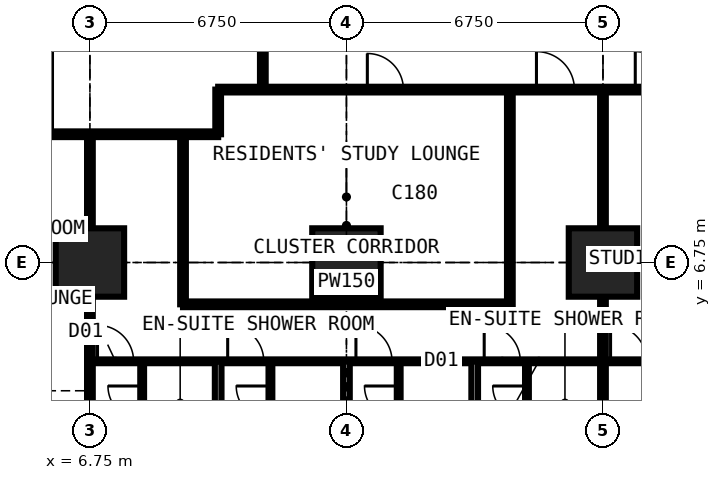
"""IFC4 building model, lengths in metres.
Left out: names, types, materials, properties, quantities, classifications, styles, units other than length and angle.
Written with IfcOpenShell. Run it as: python <this file> out.ifc"""

import sys

from ifc_helpers import new_model, si_unit, direction, frame, frame_2d, origin, origin_2d, place, context, subcontext, project, spatial, rectangle, extrude, element, fill, save


model = new_model("IFC4")
c1 = context("Model", 3, precision=1e-05, world=origin(), true_north=direction((0.0, 1.0)))
c2 = subcontext(c1, "Body", "Model", "MODEL_VIEW")
j1 = project(units=[si_unit("LENGTHUNIT", "METRE"), si_unit("PLANEANGLEUNIT", "RADIAN")], contexts=[c1])
p1 = place(None, origin())
s1 = spatial("IfcSite", under=j1, at=p1, CompositionType="ELEMENT")
p2 = place(p1, origin())
s2 = spatial("IfcBuilding", under=s1, at=p2, CompositionType="ELEMENT")
p3 = place(p2, frame((0.0, 0.0, 68.4)))
s3 = spatial("IfcBuildingStorey", under=s2, at=p3, CompositionType="ELEMENT", Elevation=68.4)
for number, where, z_axis, x_axis in (
    (1, (6.75, 6.75, 0.0), (0.0, 0.0, 1.0), (1.0, 0.0, 0.0)),
    (2, (13.5, 6.75, 0.0), (0.0, 0.0, 1.0), (1.0, 0.0, 0.0)),
    (3, (20.25, 6.75, 0.0), (0.0, 0.0, 1.0), (1.0, 0.0, 0.0)),
):
    element("IfcColumn", number, at=place(p3, frame(where, z_axis=z_axis, x_axis=x_axis)), inside=s3, PredefinedType="COLUMN", context=c2, shape_type="SweptSolid", body=[
        extrude(rectangle(XDim=1.8, YDim=1.8, at=origin_2d()), origin(), (0.0, 0.0, 1.0), 3.6),
    ])
p4 = place(p3, frame((-0.734, 10.125, 0.0), z_axis=(0.0, 0.0, 1.0), x_axis=(1.0, 0.0, 0.0)))
e4 = element("IfcWall", 4, at=p4, inside=s3, PredefinedType="PARTITIONING", context=c2, shape_type="SweptSolid", body=[
    extrude(rectangle(XDim=10.859, YDim=0.15, at=frame_2d((5.429, 0.0))), origin(), (0.0, 0.0, 1.0), 3.375),
])
p5 = place(p4, frame((5.134, 0.0, 0.0)))
e5 = element("IfcOpeningElement", 5, at=p5, cuts=e4, PredefinedType="OPENING", context=c2, shape_type="SweptSolid", body=[
    extrude(rectangle(XDim=1.0, YDim=2.2, at=frame_2d((0.5, 1.1))), frame((0.0, 0.085, 0.0), z_axis=(0.0, -1.0, 0.0), x_axis=(1.0, 0.0, 0.0)), (0.0, 0.0, 1.0), 0.17),
])
p6 = place(p3, frame((6.75, -0.734, 0.0), z_axis=(0.0, 0.0, 1.0), x_axis=(0.0, 1.0, 0.0)))
e6 = element("IfcWall", 6, at=p6, inside=s3, PredefinedType="PARTITIONING", context=c2, shape_type="SweptSolid", body=[
    extrude(rectangle(XDim=10.859, YDim=0.15, at=frame_2d((5.429, 0.0))), origin(), (0.0, 0.0, 1.0), 2.877),
])
p7 = place(p3, frame((6.75, 4.15, 0.0), z_axis=(0.0, 0.0, 1.0), x_axis=(1.0, 0.0, 0.0)))
e7 = element("IfcWall", 7, at=p7, inside=s3, PredefinedType="PARTITIONING", context=c2, shape_type="SweptSolid", body=[
    extrude(rectangle(XDim=23.625, YDim=0.1, at=frame_2d((11.812, 0.0))), origin(), (0.0, 0.0, 1.0), 3.375),
])
p8 = place(p7, frame((0.2, 0.0, 0.0)))
e8 = element("IfcOpeningElement", 8, at=p8, cuts=e7, PredefinedType="OPENING", context=c2, shape_type="SweptSolid", body=[
    extrude(rectangle(XDim=0.95, YDim=2.2, at=frame_2d((0.475, 1.1))), frame((0.0, 0.06, 0.0), z_axis=(0.0, -1.0, 0.0), x_axis=(1.0, 0.0, 0.0)), (0.0, 0.0, 1.0), 0.12),
])
p9 = place(p7, frame((3.625, 0.0, 0.0)))
e9 = element("IfcOpeningElement", 9, at=p9, cuts=e7, PredefinedType="OPENING", context=c2, shape_type="SweptSolid", body=[
    extrude(rectangle(XDim=0.95, YDim=2.2, at=frame_2d((0.475, 1.1))), frame((0.0, 0.06, 0.0), z_axis=(0.0, -1.0, 0.0), x_axis=(1.0, 0.0, 0.0)), (0.0, 0.0, 1.0), 0.12),
])
p10 = place(p7, frame((7.0, 0.0, 0.0)))
e10 = element("IfcOpeningElement", 10, at=p10, cuts=e7, PredefinedType="OPENING", context=c2, shape_type="SweptSolid", body=[
    extrude(rectangle(XDim=0.95, YDim=2.2, at=frame_2d((0.475, 1.1))), frame((0.0, 0.06, 0.0), z_axis=(0.0, -1.0, 0.0), x_axis=(1.0, 0.0, 0.0)), (0.0, 0.0, 1.0), 0.12),
])
p11 = place(p7, frame((10.375, 0.0, 0.0)))
e11 = element("IfcOpeningElement", 11, at=p11, cuts=e7, PredefinedType="OPENING", context=c2, shape_type="SweptSolid", body=[
    extrude(rectangle(XDim=0.95, YDim=2.2, at=frame_2d((0.475, 1.1))), frame((0.0, 0.06, 0.0), z_axis=(0.0, -1.0, 0.0), x_axis=(1.0, 0.0, 0.0)), (0.0, 0.0, 1.0), 0.12),
])
p12 = place(p7, frame((18.475, 0.0, 0.0)))
e12 = element("IfcOpeningElement", 12, at=p12, cuts=e7, PredefinedType="OPENING", context=c2, shape_type="SweptSolid", body=[
    extrude(rectangle(XDim=0.95, YDim=2.2, at=frame_2d((0.475, 1.1))), frame((0.0, 0.06, 0.0), z_axis=(0.0, -1.0, 0.0), x_axis=(1.0, 0.0, 0.0)), (0.0, 0.0, 1.0), 0.12),
])
p13 = place(p7, frame((13.7, 0.0, 0.0)))
e13 = element("IfcOpeningElement", 13, at=p13, cuts=e7, PredefinedType="OPENING", context=c2, shape_type="SweptSolid", body=[
    extrude(rectangle(XDim=0.95, YDim=2.2, at=frame_2d((0.475, 1.1))), frame((0.0, 0.06, 0.0), z_axis=(0.0, -1.0, 0.0), x_axis=(1.0, 0.0, 0.0)), (0.0, 0.0, 1.0), 0.12),
])
p14 = place(p3, frame((8.125, 1.95, 0.0), z_axis=(0.0, 0.0, 1.0), x_axis=(0.0, 1.0, 0.0)))
e14 = element("IfcWall", 14, at=p14, inside=s3, PredefinedType="PARTITIONING", context=c2, shape_type="SweptSolid", body=[
    extrude(rectangle(XDim=2.2, YDim=0.1, at=frame_2d((1.1, 0.0))), origin(), (0.0, 0.0, 1.0), 3.375),
])
p15 = place(p14, frame((0.65, 0.0, 0.0)))
e15 = element("IfcOpeningElement", 15, at=p15, cuts=e14, PredefinedType="OPENING", context=c2, shape_type="SweptSolid", body=[
    extrude(rectangle(XDim=0.9, YDim=2.2, at=frame_2d((0.45, 1.1))), frame((0.0, 0.06, 0.0), z_axis=(0.0, -1.0, 0.0), x_axis=(1.0, 0.0, 0.0)), (0.0, 0.0, 1.0), 0.12),
])
p16 = place(p3, frame((9.2, 5.65, 0.0), z_axis=(0.0, 0.0, 1.0), x_axis=(0.0, 1.0, 0.0)))
e16 = element("IfcWall", 16, at=p16, inside=s3, PredefinedType="PARTITIONING", context=c2, shape_type="SweptSolid", body=[
    extrude(rectangle(XDim=4.475, YDim=0.15, at=frame_2d((2.238, 0.0))), origin(), (0.0, 0.0, 1.0), 3.375),
])
p17 = place(p3, frame((9.2, 5.65, 0.0), z_axis=(0.0, 0.0, 1.0), x_axis=(1.0, 0.0, 0.0)))
e17 = element("IfcWall", 17, at=p17, inside=s3, PredefinedType="PARTITIONING", context=c2, shape_type="SweptSolid", body=[
    extrude(rectangle(XDim=8.6, YDim=0.15, at=frame_2d((4.3, 0.0))), origin(), (0.0, 0.0, 1.0), 3.375),
])
p18 = place(p3, frame((10.125, -0.734, 0.0), z_axis=(0.0, 0.0, 1.0), x_axis=(0.0, 1.0, 0.0)))
e18 = element("IfcWall", 18, at=p18, inside=s3, PredefinedType="PARTITIONING", context=c2, shape_type="SweptSolid", body=[
    extrude(rectangle(XDim=4.884, YDim=0.175, at=frame_2d((2.442, 0.0))), origin(), (0.0, 0.0, 1.0), 3.375),
])
p19 = place(p3, frame((10.125, 10.125, 0.0), z_axis=(0.0, 0.0, 1.0), x_axis=(0.0, 1.0, 0.0)))
e19 = element("IfcWall", 19, at=p19, inside=s3, PredefinedType="PARTITIONING", context=c2, shape_type="SweptSolid", body=[
    extrude(rectangle(XDim=1.175, YDim=0.15, at=frame_2d((0.587, 0.0))), origin(), (0.0, 0.0, 1.0), 3.375),
])
p20 = place(p3, frame((10.125, 11.3, 0.0), z_axis=(0.0, 0.0, 1.0), x_axis=(1.0, 0.0, 0.0)))
e20 = element("IfcWall", 20, at=p20, inside=s3, PredefinedType="PARTITIONING", context=c2, shape_type="SweptSolid", body=[
    extrude(rectangle(XDim=20.675, YDim=0.15, at=frame_2d((10.337, 0.0))), origin(), (0.0, 0.0, 1.0), 3.375),
])
p21 = place(p20, frame((8.375, 0.0, 0.0)))
e21 = element("IfcOpeningElement", 21, at=p21, cuts=e20, PredefinedType="OPENING", context=c2, shape_type="SweptSolid", body=[
    extrude(rectangle(XDim=1.0, YDim=2.2, at=frame_2d((0.5, 1.1))), frame((0.0, 0.085, 0.0), z_axis=(0.0, -1.0, 0.0), x_axis=(1.0, 0.0, 0.0)), (0.0, 0.0, 1.0), 0.17),
])
p22 = place(p20, frame((10.975, 0.0, 0.0)))
e22 = element("IfcOpeningElement", 22, at=p22, cuts=e20, PredefinedType="OPENING", context=c2, shape_type="SweptSolid", body=[
    extrude(rectangle(XDim=1.0, YDim=2.2, at=frame_2d((0.5, 1.1))), frame((0.0, 0.085, 0.0), z_axis=(0.0, -1.0, 0.0), x_axis=(1.0, 0.0, 0.0)), (0.0, 0.0, 1.0), 0.17),
])
p23 = place(p20, frame((3.925, 0.0, 0.0)))
e23 = element("IfcOpeningElement", 23, at=p23, cuts=e20, PredefinedType="OPENING", context=c2, shape_type="SweptSolid", body=[
    extrude(rectangle(XDim=0.95, YDim=2.2, at=frame_2d((0.475, 1.1))), frame((0.0, 0.085, 0.0), z_axis=(0.0, -1.0, 0.0), x_axis=(1.0, 0.0, 0.0)), (0.0, 0.0, 1.0), 0.17),
])
p24 = place(p3, frame((11.3, 11.3, 0.0), z_axis=(0.0, 0.0, 1.0), x_axis=(0.0, 1.0, 0.0)))
e24 = element("IfcWall", 24, at=p24, inside=s3, PredefinedType="PARTITIONING", context=c2, shape_type="SweptSolid", body=[
    extrude(rectangle(XDim=19.075, YDim=0.15, at=frame_2d((9.538, 0.0))), origin(), (0.0, 0.0, 1.0), 3.375),
])
p25 = place(p24, frame((12.875, 0.0, 0.0)))
e25 = element("IfcOpeningElement", 25, at=p25, cuts=e24, PredefinedType="OPENING", context=c2, shape_type="SweptSolid", body=[
    extrude(rectangle(XDim=1.0, YDim=2.2, at=frame_2d((0.5, 1.1))), frame((0.0, 0.085, 0.0), z_axis=(0.0, -1.0, 0.0), x_axis=(1.0, 0.0, 0.0)), (0.0, 0.0, 1.0), 0.17),
])
p26 = place(p24, frame((10.438, 0.0, 0.0)))
e26 = element("IfcOpeningElement", 26, at=p26, cuts=e24, PredefinedType="OPENING", context=c2, shape_type="SweptSolid", body=[
    extrude(rectangle(XDim=1.0, YDim=2.2, at=frame_2d((0.5, 1.1))), frame((0.0, 0.085, 0.0), z_axis=(0.0, -1.0, 0.0), x_axis=(1.0, 0.0, 0.0)), (0.0, 0.0, 1.0), 0.17),
])
p27 = place(p24, frame((15.675, 0.0, 0.0)))
e27 = element("IfcOpeningElement", 27, at=p27, cuts=e24, PredefinedType="OPENING", context=c2, shape_type="SweptSolid", body=[
    extrude(rectangle(XDim=0.95, YDim=2.2, at=frame_2d((0.475, 1.1))), frame((0.0, 0.085, 0.0), z_axis=(0.0, -1.0, 0.0), x_axis=(1.0, 0.0, 0.0)), (0.0, 0.0, 1.0), 0.17),
])
p28 = place(p3, frame((11.5, 1.95, 0.0), z_axis=(0.0, 0.0, 1.0), x_axis=(0.0, 1.0, 0.0)))
e28 = element("IfcWall", 28, at=p28, inside=s3, PredefinedType="PARTITIONING", context=c2, shape_type="SweptSolid", body=[
    extrude(rectangle(XDim=2.2, YDim=0.1, at=frame_2d((1.1, 0.0))), origin(), (0.0, 0.0, 1.0), 3.375),
])
p29 = place(p28, frame((0.65, 0.0, 0.0)))
e29 = element("IfcOpeningElement", 29, at=p29, cuts=e28, PredefinedType="OPENING", context=c2, shape_type="SweptSolid", body=[
    extrude(rectangle(XDim=0.9, YDim=2.2, at=frame_2d((0.45, 1.1))), frame((0.0, 0.06, 0.0), z_axis=(0.0, -1.0, 0.0), x_axis=(1.0, 0.0, 0.0)), (0.0, 0.0, 1.0), 0.12),
])
p30 = place(p3, frame((13.5, -0.734, 0.0), z_axis=(0.0, 0.0, 1.0), x_axis=(0.0, 1.0, 0.0)))
e30 = element("IfcWall", 30, at=p30, inside=s3, PredefinedType="PARTITIONING", context=c2, shape_type="SweptSolid", body=[
    extrude(rectangle(XDim=4.884, YDim=0.175, at=frame_2d((2.442, 0.0))), origin(), (0.0, 0.0, 1.0), 2.877),
])
p31 = place(p3, frame((14.875, 1.95, 0.0), z_axis=(0.0, 0.0, 1.0), x_axis=(0.0, 1.0, 0.0)))
e31 = element("IfcWall", 31, at=p31, inside=s3, PredefinedType="PARTITIONING", context=c2, shape_type="SweptSolid", body=[
    extrude(rectangle(XDim=2.2, YDim=0.1, at=frame_2d((1.1, 0.0))), origin(), (0.0, 0.0, 1.0), 3.375),
])
p32 = place(p31, frame((0.65, 0.0, 0.0)))
e32 = element("IfcOpeningElement", 32, at=p32, cuts=e31, PredefinedType="OPENING", context=c2, shape_type="SweptSolid", body=[
    extrude(rectangle(XDim=0.9, YDim=2.2, at=frame_2d((0.45, 1.1))), frame((0.0, 0.06, 0.0), z_axis=(0.0, -1.0, 0.0), x_axis=(1.0, 0.0, 0.0)), (0.0, 0.0, 1.0), 0.12),
])
p33 = place(p3, frame((16.875, -0.734, 0.0), z_axis=(0.0, 0.0, 1.0), x_axis=(0.0, 1.0, 0.0)))
e33 = element("IfcWall", 33, at=p33, inside=s3, PredefinedType="PARTITIONING", context=c2, shape_type="SweptSolid", body=[
    extrude(rectangle(XDim=4.884, YDim=0.175, at=frame_2d((2.442, 0.0))), origin(), (0.0, 0.0, 1.0), 3.375),
])
p34 = place(p3, frame((17.8, 5.65, 0.0), z_axis=(0.0, 0.0, 1.0), x_axis=(0.0, 1.0, 0.0)))
e34 = element("IfcWall", 34, at=p34, inside=s3, PredefinedType="PARTITIONING", context=c2, shape_type="SweptSolid", body=[
    extrude(rectangle(XDim=5.65, YDim=0.15, at=frame_2d((2.825, 0.0))), origin(), (0.0, 0.0, 1.0), 3.375),
])
p35 = place(p3, frame((18.25, 1.95, 0.0), z_axis=(0.0, 0.0, 1.0), x_axis=(0.0, 1.0, 0.0)))
e35 = element("IfcWall", 35, at=p35, inside=s3, PredefinedType="PARTITIONING", context=c2, shape_type="SweptSolid", body=[
    extrude(rectangle(XDim=2.2, YDim=0.1, at=frame_2d((1.1, 0.0))), origin(), (0.0, 0.0, 1.0), 3.375),
])
p36 = place(p35, frame((0.65, 0.0, 0.0)))
e36 = element("IfcOpeningElement", 36, at=p36, cuts=e35, PredefinedType="OPENING", context=c2, shape_type="SweptSolid", body=[
    extrude(rectangle(XDim=0.9, YDim=2.2, at=frame_2d((0.45, 1.1))), frame((0.0, 0.06, 0.0), z_axis=(0.0, -1.0, 0.0), x_axis=(1.0, 0.0, 0.0)), (0.0, 0.0, 1.0), 0.12),
])
p37 = place(p3, frame((20.25, -0.734, 0.0), z_axis=(0.0, 0.0, 1.0), x_axis=(0.0, 1.0, 0.0)))
e37 = element("IfcWall", 37, at=p37, inside=s3, PredefinedType="PARTITIONING", context=c2, shape_type="SweptSolid", body=[
    extrude(rectangle(XDim=12.034, YDim=0.15, at=frame_2d((6.017, 0.0))), origin(), (0.0, 0.0, 1.0), 2.61),
])
p38 = place(p8, origin())
e38 = element("IfcDoor", 38, at=p38, inside=s3, OperationType="SINGLE_SWING_LEFT", PredefinedType="DOOR", context=c2, shape_type="SweptSolid", body=[
    extrude(rectangle(XDim=0.95, YDim=2.2, at=frame_2d((0.475, 1.1))), frame((0.0, 0.025, 0.0), z_axis=(0.0, -1.0, 0.0), x_axis=(1.0, 0.0, 0.0)), (0.0, 0.0, 1.0), 0.05),
])
fill(e8, e38)
p39 = place(p15, origin())
e39 = element("IfcDoor", 39, at=p39, inside=s3, OperationType="SINGLE_SWING_RIGHT", PredefinedType="DOOR", context=c2, shape_type="SweptSolid", body=[
    extrude(rectangle(XDim=0.9, YDim=2.2, at=frame_2d((0.45, 1.1))), frame((0.0, 0.025, 0.0), z_axis=(0.0, -1.0, 0.0), x_axis=(1.0, 0.0, 0.0)), (0.0, 0.0, 1.0), 0.05),
])
fill(e15, e39)
p40 = place(p9, origin())
e40 = element("IfcDoor", 40, at=p40, inside=s3, OperationType="SINGLE_SWING_LEFT", PredefinedType="DOOR", context=c2, shape_type="SweptSolid", body=[
    extrude(rectangle(XDim=0.95, YDim=2.2, at=frame_2d((0.475, 1.1))), frame((0.0, 0.025, 0.0), z_axis=(0.0, -1.0, 0.0), x_axis=(1.0, 0.0, 0.0)), (0.0, 0.0, 1.0), 0.05),
])
fill(e9, e40)
p41 = place(p29, origin())
e41 = element("IfcDoor", 41, at=p41, inside=s3, OperationType="SINGLE_SWING_RIGHT", PredefinedType="DOOR", context=c2, shape_type="SweptSolid", body=[
    extrude(rectangle(XDim=0.9, YDim=2.2, at=frame_2d((0.45, 1.1))), frame((0.0, 0.025, 0.0), z_axis=(0.0, -1.0, 0.0), x_axis=(1.0, 0.0, 0.0)), (0.0, 0.0, 1.0), 0.05),
])
fill(e29, e41)
p42 = place(p10, origin())
e42 = element("IfcDoor", 42, at=p42, inside=s3, OperationType="SINGLE_SWING_LEFT", PredefinedType="DOOR", context=c2, shape_type="SweptSolid", body=[
    extrude(rectangle(XDim=0.95, YDim=2.2, at=frame_2d((0.475, 1.1))), frame((0.0, 0.025, 0.0), z_axis=(0.0, -1.0, 0.0), x_axis=(1.0, 0.0, 0.0)), (0.0, 0.0, 1.0), 0.05),
])
fill(e10, e42)
p43 = place(p32, origin())
e43 = element("IfcDoor", 43, at=p43, inside=s3, OperationType="SINGLE_SWING_RIGHT", PredefinedType="DOOR", context=c2, shape_type="SweptSolid", body=[
    extrude(rectangle(XDim=0.9, YDim=2.2, at=frame_2d((0.45, 1.1))), frame((0.0, 0.025, 0.0), z_axis=(0.0, -1.0, 0.0), x_axis=(1.0, 0.0, 0.0)), (0.0, 0.0, 1.0), 0.05),
])
fill(e32, e43)
p44 = place(p11, origin())
e44 = element("IfcDoor", 44, at=p44, inside=s3, OperationType="SINGLE_SWING_LEFT", PredefinedType="DOOR", context=c2, shape_type="SweptSolid", body=[
    extrude(rectangle(XDim=0.95, YDim=2.2, at=frame_2d((0.475, 1.1))), frame((0.0, 0.025, 0.0), z_axis=(0.0, -1.0, 0.0), x_axis=(1.0, 0.0, 0.0)), (0.0, 0.0, 1.0), 0.05),
])
fill(e11, e44)
p45 = place(p36, origin())
e45 = element("IfcDoor", 45, at=p45, inside=s3, OperationType="SINGLE_SWING_RIGHT", PredefinedType="DOOR", context=c2, shape_type="SweptSolid", body=[
    extrude(rectangle(XDim=0.9, YDim=2.2, at=frame_2d((0.45, 1.1))), frame((0.0, 0.025, 0.0), z_axis=(0.0, -1.0, 0.0), x_axis=(1.0, 0.0, 0.0)), (0.0, 0.0, 1.0), 0.05),
])
fill(e36, e45)
p46 = place(p21, origin())
e46 = element("IfcDoor", 46, at=p46, inside=s3, OperationType="SINGLE_SWING_LEFT", PredefinedType="DOOR", context=c2, shape_type="SweptSolid", body=[
    extrude(rectangle(XDim=1.0, YDim=2.2, at=frame_2d((0.5, 1.1))), frame((0.0, 0.025, 0.0), z_axis=(0.0, -1.0, 0.0), x_axis=(1.0, 0.0, 0.0)), (0.0, 0.0, 1.0), 0.05),
])
fill(e21, e46)
p47 = place(p13, origin())
e47 = element("IfcDoor", 47, at=p47, inside=s3, OperationType="SINGLE_SWING_LEFT", PredefinedType="DOOR", context=c2, shape_type="SweptSolid", body=[
    extrude(rectangle(XDim=0.95, YDim=2.2, at=frame_2d((0.475, 1.1))), frame((0.0, 0.025, 0.0), z_axis=(0.0, -1.0, 0.0), x_axis=(1.0, 0.0, 0.0)), (0.0, 0.0, 1.0), 0.05),
])
fill(e13, e47)
p48 = place(p22, origin())
e48 = element("IfcDoor", 48, at=p48, inside=s3, OperationType="SINGLE_SWING_LEFT", PredefinedType="DOOR", context=c2, shape_type="SweptSolid", body=[
    extrude(rectangle(XDim=1.0, YDim=2.2, at=frame_2d((0.5, 1.1))), frame((0.0, 0.025, 0.0), z_axis=(0.0, -1.0, 0.0), x_axis=(1.0, 0.0, 0.0)), (0.0, 0.0, 1.0), 0.05),
])
fill(e22, e48)
p49 = place(p23, origin())
e49 = element("IfcDoor", 49, at=p49, inside=s3, OperationType="SINGLE_SWING_LEFT", PredefinedType="DOOR", context=c2, shape_type="SweptSolid", body=[
    extrude(rectangle(XDim=0.95, YDim=2.2, at=frame_2d((0.475, 1.1))), frame((0.0, 0.025, 0.0), z_axis=(0.0, -1.0, 0.0), x_axis=(1.0, 0.0, 0.0)), (0.0, 0.0, 1.0), 0.05),
])
fill(e23, e49)
save(model, sys.argv[1])
